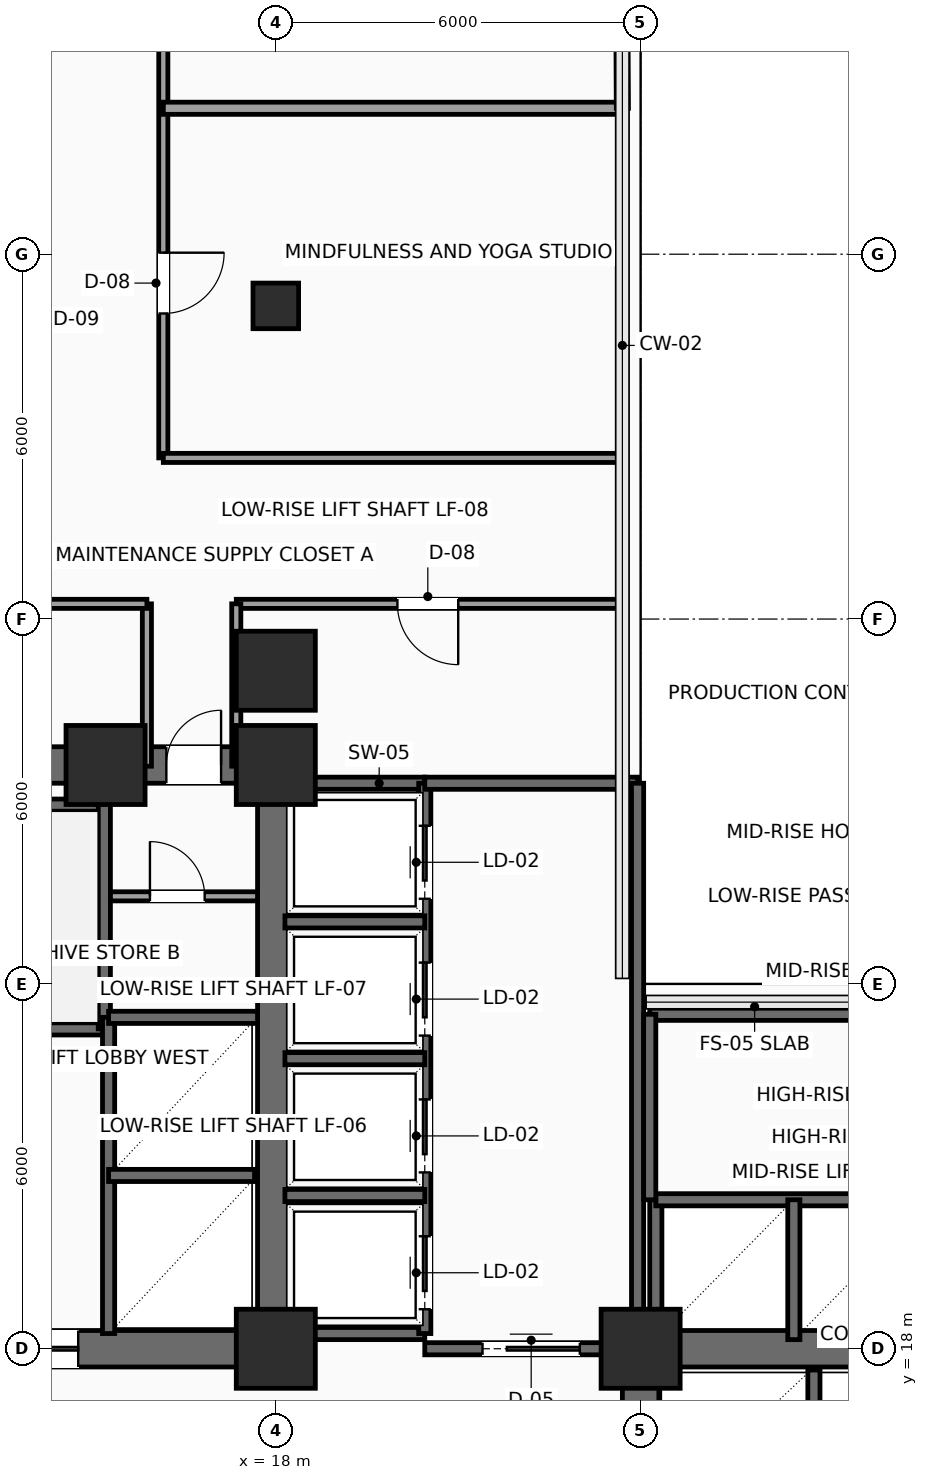
"""IFC4 building model, lengths in metres.
Left out: names, types, materials, properties, quantities, classifications, styles, units other than length and angle.
Written with IfcOpenShell. Run it as: python <this file> out.ifc"""

import sys

from ifc_helpers import new_model, si_unit, direction, frame, frame_2d, origin, origin_2d, place, context, subcontext, project, spatial, rectangle, hollow_rectangle, extrude, element, fill, save


model = new_model("IFC4")
c1 = context("Model", 3, precision=1e-05, world=origin(), true_north=direction((0.0, 1.0)))
c2 = subcontext(c1, "Body", "Model", "MODEL_VIEW")
j1 = project(units=[si_unit("LENGTHUNIT", "METRE"), si_unit("PLANEANGLEUNIT", "RADIAN")], contexts=[c1])
p1 = place(None, origin())
s1 = spatial("IfcSite", under=j1, at=p1, CompositionType="ELEMENT")
p2 = place(p1, origin())
s2 = spatial("IfcBuilding", under=s1, at=p2, CompositionType="ELEMENT")
p3 = place(p2, frame((0.0, 0.0, 67.5)))
s3 = spatial("IfcBuildingStorey", under=s2, at=p3, CompositionType="ELEMENT", Elevation=67.5)
for number, where, z_axis, x_axis in (
    (1, (18.0, 18.0, 0.0), (0.0, 0.0, 1.0), (1.0, 0.0, 0.0)),
    (2, (15.2, 27.6, 0.0), (0.0, 0.0, 1.0), (1.0, 0.0, 0.0)),
    (3, (18.0, 27.6, 0.0), (0.0, 0.0, 1.0), (1.0, 0.0, 0.0)),
    (4, (24.0, 18.0, 0.0), (0.0, 0.0, 1.0), (1.0, 0.0, 0.0)),
    (5, (18.0, 29.15, 0.0), (0.0, 0.0, 1.0), (1.0, 0.0, 0.0)),
):
    element("IfcColumn", number, at=place(p3, frame(where, z_axis=z_axis, x_axis=x_axis)), inside=s3, PredefinedType="COLUMN", context=c2, shape_type="SweptSolid", body=[
        extrude(rectangle(XDim=1.3, YDim=1.3, at=origin_2d()), origin(), (0.0, 0.0, 1.0), 3.9),
    ])
p4 = place(p3, frame((18.0, 35.15, 0.0), z_axis=(0.0, 0.0, 1.0), x_axis=(1.0, 0.0, 0.0)))
e6 = element("IfcColumn", 6, at=p4, inside=s3, PredefinedType="COLUMN", context=c2, shape_type="SweptSolid", body=[
    extrude(hollow_rectangle(XDim=0.75, YDim=0.75, WallThickness=0.035, InnerFilletRadius=0.035, OuterFilletRadius=0.05, at=origin_2d()), origin(), (0.0, 0.0, 1.0), 3.9),
])
p5 = place(p3, frame((6.0, 18.0, 0.0), z_axis=(0.0, 0.0, 1.0), x_axis=(1.0, 0.0, 0.0)))
e7 = element("IfcWall", 7, at=p5, inside=s3, PredefinedType="SHEAR", context=c2, shape_type="SweptSolid", body=[
    extrude(rectangle(XDim=12.0, YDim=0.6, at=frame_2d((6.0, 0.0))), origin(), (0.0, 0.0, 1.0), 3.65),
])
p6 = place(p5, frame((7.15, 0.0, 0.0)))
e8 = element("IfcOpeningElement", 8, at=p6, cuts=e7, PredefinedType="OPENING", context=c2, shape_type="SweptSolid", body=[
    extrude(rectangle(XDim=1.6, YDim=2.3, at=frame_2d((0.8, 1.15))), frame((0.0, 0.31, 0.0), z_axis=(0.0, -1.0, 0.0), x_axis=(1.0, 0.0, 0.0)), (0.0, 0.0, 1.0), 0.62),
])
p7 = place(p3, frame((6.0, 27.6, 0.0), z_axis=(0.0, 0.0, 1.0), x_axis=(1.0, 0.0, 0.0)))
e9 = element("IfcWall", 9, at=p7, inside=s3, PredefinedType="SHEAR", context=c2, shape_type="SweptSolid", body=[
    extrude(rectangle(XDim=12.0, YDim=0.6, at=frame_2d((6.0, 0.0))), origin(), (0.0, 0.0, 1.0), 3.65),
])
p8 = place(p7, frame((10.2, 0.0, 0.0)))
e10 = element("IfcOpeningElement", 10, at=p8, cuts=e9, PredefinedType="OPENING", context=c2, shape_type="SweptSolid", body=[
    extrude(rectangle(XDim=0.9, YDim=2.15, at=frame_2d((0.45, 1.075))), frame((0.0, 0.31, 0.0), z_axis=(0.0, -1.0, 0.0), x_axis=(1.0, 0.0, 0.0)), (0.0, 0.0, 1.0), 0.62),
])
for number, where, z_axis, x_axis in (
    (11, (18.0, 18.0, 0.0), (0.0, 0.0, 1.0), (0.0, 1.0, 0.0)),
    (12, (24.0, 18.0, 0.0), (0.0, 0.0, 1.0), (1.0, 0.0, 0.0)),
):
    element("IfcWall", number, at=place(p3, frame(where, z_axis=z_axis, x_axis=x_axis)), inside=s3, PredefinedType="SHEAR", context=c2, shape_type="SweptSolid", body=[
        extrude(rectangle(XDim=9.6, YDim=0.6, at=frame_2d((4.8, 0.0))), origin(), (0.0, 0.0, 1.0), 3.65),
    ])
p9 = place(p3, frame((24.0, 6.0, 0.0), z_axis=(0.0, 0.0, 1.0), x_axis=(0.0, 1.0, 0.0)))
e13 = element("IfcWall", 13, at=p9, inside=s3, PredefinedType="SHEAR", context=c2, shape_type="SweptSolid", body=[
    extrude(rectangle(XDim=12.0, YDim=0.6, at=frame_2d((6.0, 0.0))), origin(), (0.0, 0.0, 1.0), 3.65),
])
p10 = place(p9, frame((7.15, 0.0, 0.0)))
e14 = element("IfcOpeningElement", 14, at=p10, cuts=e13, PredefinedType="OPENING", context=c2, shape_type="SweptSolid", body=[
    extrude(rectangle(XDim=1.6, YDim=2.3, at=frame_2d((0.8, 1.15))), frame((0.0, 0.31, 0.0), z_axis=(0.0, -1.0, 0.0), x_axis=(1.0, 0.0, 0.0)), (0.0, 0.0, 1.0), 0.62),
])
p11 = place(p3, frame((6.3, 23.26, 0.0), z_axis=(0.0, 0.0, 1.0), x_axis=(1.0, 0.0, 0.0)))
e15 = element("IfcWall", 15, at=p11, inside=s3, PredefinedType="SHEAR", context=c2, shape_type="SweptSolid", body=[
    extrude(rectangle(XDim=8.88, YDim=0.2, at=frame_2d((4.44, 0.0))), origin(), (0.0, 0.0, 1.0), 3.65),
])
p12 = place(p11, frame((0.35, 0.0, 0.0)))
e16 = element("IfcOpeningElement", 16, at=p12, cuts=e15, PredefinedType="OPENING", context=c2, shape_type="SweptSolid", body=[
    extrude(rectangle(XDim=1.1, YDim=2.2, at=frame_2d((0.55, 1.1))), frame((0.0, 0.11, 0.0), z_axis=(0.0, -1.0, 0.0), x_axis=(1.0, 0.0, 0.0)), (0.0, 0.0, 1.0), 0.22),
])
p13 = place(p3, frame((6.3, 26.94, 0.0), z_axis=(0.0, 0.0, 1.0), x_axis=(1.0, 0.0, 0.0)))
e17 = element("IfcWall", 17, at=p13, inside=s3, PredefinedType="SHEAR", context=c2, shape_type="SweptSolid", body=[
    extrude(rectangle(XDim=8.88, YDim=0.2, at=frame_2d((4.44, 0.0))), origin(), (0.0, 0.0, 1.0), 3.65),
])
p14 = place(p3, frame((15.18, 23.26, 0.0), z_axis=(0.0, 0.0, 1.0), x_axis=(0.0, 1.0, 0.0)))
e18 = element("IfcWall", 18, at=p14, inside=s3, PredefinedType="SHEAR", context=c2, shape_type="SweptSolid", body=[
    extrude(rectangle(XDim=4.04, YDim=0.2, at=frame_2d((2.02, 0.0))), origin(), (0.0, 0.0, 1.0), 3.65),
])
p15 = place(p3, frame((15.25, 18.25, 0.0), z_axis=(0.0, 0.0, 1.0), x_axis=(0.0, 1.0, 0.0)))
e19 = element("IfcWall", 19, at=p15, inside=s3, PredefinedType="SHEAR", context=c2, shape_type="SweptSolid", body=[
    extrude(rectangle(XDim=5.2, YDim=0.2, at=frame_2d((2.6, 0.0))), origin(), (0.0, 0.0, 1.0), 3.65),
])
p16 = place(p3, frame((15.25, 20.85, 0.0), z_axis=(0.0, 0.0, 1.0), x_axis=(1.0, 0.0, 0.0)))
e20 = element("IfcWall", 20, at=p16, inside=s3, PredefinedType="SHEAR", context=c2, shape_type="SweptSolid", body=[
    extrude(rectangle(XDim=2.4, YDim=0.2, at=frame_2d((1.2, 0.0))), origin(), (0.0, 0.0, 1.0), 3.65),
])
p17 = place(p3, frame((15.25, 23.45, 0.0), z_axis=(0.0, 0.0, 1.0), x_axis=(1.0, 0.0, 0.0)))
e21 = element("IfcWall", 21, at=p17, inside=s3, PredefinedType="SHEAR", context=c2, shape_type="SweptSolid", body=[
    extrude(rectangle(XDim=2.45, YDim=0.2, at=frame_2d((1.225, 0.0))), origin(), (0.0, 0.0, 1.0), 3.65),
])
p18 = place(p3, frame((26.85, 15.25, 0.0), z_axis=(0.0, 0.0, 1.0), x_axis=(0.0, 1.0, 0.0)))
e22 = element("IfcWall", 22, at=p18, inside=s3, PredefinedType="SHEAR", context=c2, shape_type="SweptSolid", body=[
    extrude(rectangle(XDim=2.4, YDim=0.2, at=frame_2d((1.2, 0.0))), origin(), (0.0, 0.0, 1.0), 3.65),
])
p19 = place(p3, frame((15.28, 25.44, 0.0), z_axis=(0.0, 0.0, 1.0), x_axis=(1.0, 0.0, 0.0)))
e23 = element("IfcWall", 23, at=p19, inside=s3, PredefinedType="PARTITIONING", context=c2, shape_type="SweptSolid", body=[
    extrude(rectangle(XDim=2.42, YDim=0.15, at=frame_2d((1.21, 0.0))), origin(), (0.0, 0.0, 1.0), 3.65),
])
p20 = place(p19, frame((0.65, 0.0, 0.0)))
e24 = element("IfcOpeningElement", 24, at=p20, cuts=e23, PredefinedType="OPENING", context=c2, shape_type="SweptSolid", body=[
    extrude(rectangle(XDim=0.9, YDim=2.15, at=frame_2d((0.45, 1.075))), frame((0.0, 0.085, 0.0), z_axis=(0.0, -1.0, 0.0), x_axis=(1.0, 0.0, 0.0)), (0.0, 0.0, 1.0), 0.17),
])
for number, where, z_axis, x_axis in (
    (25, (18.1, 27.3, 0.0), (0.0, 0.0, 1.0), (1.0, 0.0, 0.0)),
    (26, (18.1, 18.25, 0.0), (0.0, 0.0, 1.0), (1.0, 0.0, 0.0)),
):
    element("IfcWall", number, at=place(p3, frame(where, z_axis=z_axis, x_axis=x_axis)), inside=s3, PredefinedType="SHEAR", context=c2, shape_type="SweptSolid", body=[
        extrude(rectangle(XDim=2.35, YDim=0.2, at=frame_2d((1.175, 0.0))), origin(), (0.0, 0.0, 1.0), 3.65),
    ])
p21 = place(p3, frame((20.45, 18.25, 0.0), z_axis=(0.0, 0.0, 1.0), x_axis=(0.0, 1.0, 0.0)))
e27 = element("IfcWall", 27, at=p21, inside=s3, PredefinedType="SHEAR", context=c2, shape_type="SweptSolid", body=[
    extrude(rectangle(XDim=9.05, YDim=0.2, at=frame_2d((4.525, 0.0))), origin(), (0.0, 0.0, 1.0), 3.65),
])
p22 = place(p21, frame((0.4, 0.0, 0.0)))
e28 = element("IfcOpeningElement", 28, at=p22, cuts=e27, PredefinedType="OPENING", context=c2, shape_type="SweptSolid", body=[
    extrude(rectangle(XDim=1.2, YDim=2.2, at=frame_2d((0.6, 1.1))), frame((0.0, 0.11, 0.0), z_axis=(0.0, -1.0, 0.0), x_axis=(1.0, 0.0, 0.0)), (0.0, 0.0, 1.0), 0.22),
])
p23 = place(p21, frame((2.65, 0.0, 0.0)))
e29 = element("IfcOpeningElement", 29, at=p23, cuts=e27, PredefinedType="OPENING", context=c2, shape_type="SweptSolid", body=[
    extrude(rectangle(XDim=1.2, YDim=2.2, at=frame_2d((0.6, 1.1))), frame((0.0, 0.11, 0.0), z_axis=(0.0, -1.0, 0.0), x_axis=(1.0, 0.0, 0.0)), (0.0, 0.0, 1.0), 0.22),
])
p24 = place(p21, frame((4.9, 0.0, 0.0)))
e30 = element("IfcOpeningElement", 30, at=p24, cuts=e27, PredefinedType="OPENING", context=c2, shape_type="SweptSolid", body=[
    extrude(rectangle(XDim=1.2, YDim=2.2, at=frame_2d((0.6, 1.1))), frame((0.0, 0.11, 0.0), z_axis=(0.0, -1.0, 0.0), x_axis=(1.0, 0.0, 0.0)), (0.0, 0.0, 1.0), 0.22),
])
p25 = place(p21, frame((7.15, 0.0, 0.0)))
e31 = element("IfcOpeningElement", 31, at=p25, cuts=e27, PredefinedType="OPENING", context=c2, shape_type="SweptSolid", body=[
    extrude(rectangle(XDim=1.2, YDim=2.2, at=frame_2d((0.6, 1.1))), frame((0.0, 0.11, 0.0), z_axis=(0.0, -1.0, 0.0), x_axis=(1.0, 0.0, 0.0)), (0.0, 0.0, 1.0), 0.22),
])
for number, where, z_axis, x_axis in (
    (32, (18.15, 20.52, 0.0), (0.0, 0.0, 1.0), (1.0, 0.0, 0.0)),
    (33, (18.15, 22.77, 0.0), (0.0, 0.0, 1.0), (1.0, 0.0, 0.0)),
    (34, (18.15, 25.02, 0.0), (0.0, 0.0, 1.0), (1.0, 0.0, 0.0)),
):
    element("IfcWall", number, at=place(p3, frame(where, z_axis=z_axis, x_axis=x_axis)), inside=s3, PredefinedType="SHEAR", context=c2, shape_type="SweptSolid", body=[
        extrude(rectangle(XDim=2.3, YDim=0.2, at=frame_2d((1.15, 0.0))), origin(), (0.0, 0.0, 1.0), 3.65),
    ])
p26 = place(p3, frame((20.45, 18.0, 0.0), z_axis=(0.0, 0.0, 1.0), x_axis=(1.0, 0.0, 0.0)))
e35 = element("IfcWall", 35, at=p26, inside=s3, PredefinedType="SHEAR", context=c2, shape_type="SweptSolid", body=[
    extrude(rectangle(XDim=3.5, YDim=0.2, at=frame_2d((1.75, 0.0))), origin(), (0.0, 0.0, 1.0), 3.65),
])
p27 = place(p26, frame((0.95, 0.0, 0.0)))
e36 = element("IfcOpeningElement", 36, at=p27, cuts=e35, PredefinedType="OPENING", context=c2, shape_type="SweptSolid", body=[
    extrude(rectangle(XDim=1.6, YDim=2.3, at=frame_2d((0.8, 1.15))), frame((0.0, 0.11, 0.0), z_axis=(0.0, -1.0, 0.0), x_axis=(1.0, 0.0, 0.0)), (0.0, 0.0, 1.0), 0.22),
])
p28 = place(p3, frame((20.45, 27.3, 0.0), z_axis=(0.0, 0.0, 1.0), x_axis=(1.0, 0.0, 0.0)))
e37 = element("IfcWall", 37, at=p28, inside=s3, PredefinedType="SHEAR", context=c2, shape_type="SweptSolid", body=[
    extrude(rectangle(XDim=3.5, YDim=0.2, at=frame_2d((1.75, 0.0))), origin(), (0.0, 0.0, 1.0), 3.65),
])
p29 = place(p3, frame((23.95, 18.0, 0.0), z_axis=(0.0, 0.0, 1.0), x_axis=(0.0, 1.0, 0.0)))
e38 = element("IfcWall", 38, at=p29, inside=s3, PredefinedType="SHEAR", context=c2, shape_type="SweptSolid", body=[
    extrude(rectangle(XDim=9.3, YDim=0.2, at=frame_2d((4.65, 0.0))), origin(), (0.0, 0.0, 1.0), 3.65),
])
p30 = place(p3, frame((24.25, 18.1, 0.0), z_axis=(0.0, 0.0, 1.0), x_axis=(0.0, 1.0, 0.0)))
e39 = element("IfcWall", 39, at=p30, inside=s3, PredefinedType="SHEAR", context=c2, shape_type="SweptSolid", body=[
    extrude(rectangle(XDim=2.35, YDim=0.2, at=frame_2d((1.175, 0.0))), origin(), (0.0, 0.0, 1.0), 3.65),
])
p31 = place(p3, frame((24.25, 20.45, 0.0), z_axis=(0.0, 0.0, 1.0), x_axis=(1.0, 0.0, 0.0)))
e40 = element("IfcWall", 40, at=p31, inside=s3, PredefinedType="SHEAR", context=c2, shape_type="SweptSolid", body=[
    extrude(rectangle(XDim=9.05, YDim=0.2, at=frame_2d((4.525, 0.0))), origin(), (0.0, 0.0, 1.0), 3.65),
])
p32 = place(p3, frame((26.52, 18.15, 0.0), z_axis=(0.0, 0.0, 1.0), x_axis=(0.0, 1.0, 0.0)))
e41 = element("IfcWall", 41, at=p32, inside=s3, PredefinedType="SHEAR", context=c2, shape_type="SweptSolid", body=[
    extrude(rectangle(XDim=2.3, YDim=0.2, at=frame_2d((1.15, 0.0))), origin(), (0.0, 0.0, 1.0), 3.65),
])
p33 = place(p3, frame((24.15, 23.5, 0.0), z_axis=(0.0, 0.0, 1.0), x_axis=(1.0, 0.0, 0.0)))
e42 = element("IfcWall", 42, at=p33, inside=s3, PredefinedType="SHEAR", context=c2, shape_type="SweptSolid", body=[
    extrude(rectangle(XDim=9.15, YDim=0.2, at=frame_2d((4.575, 0.0))), origin(), (0.0, 0.0, 1.0), 3.65),
])
p34 = place(p3, frame((24.15, 20.45, 0.0), z_axis=(0.0, 0.0, 1.0), x_axis=(0.0, 1.0, 0.0)))
e43 = element("IfcWall", 43, at=p34, inside=s3, PredefinedType="SHEAR", context=c2, shape_type="SweptSolid", body=[
    extrude(rectangle(XDim=3.05, YDim=0.2, at=frame_2d((1.525, 0.0))), origin(), (0.0, 0.0, 1.0), 3.65),
])
p35 = place(p3, frame((16.15, 44.9, 0.0), z_axis=(0.0, 0.0, 1.0), x_axis=(0.0, -1.0, 0.0)))
e44 = element("IfcWall", 44, at=p35, inside=s3, PredefinedType="PARTITIONING", context=c2, shape_type="SweptSolid", body=[
    extrude(rectangle(XDim=12.25, YDim=0.15, at=frame_2d((6.125, 0.0))), origin(), (0.0, 0.0, 1.0), 3.65),
])
p36 = place(p35, frame((8.875, 0.0, 0.0)))
e45 = element("IfcOpeningElement", 45, at=p36, cuts=e44, PredefinedType="OPENING", context=c2, shape_type="SweptSolid", body=[
    extrude(rectangle(XDim=1.0, YDim=2.2, at=frame_2d((0.5, 1.1))), frame((0.0, 0.085, 0.0), z_axis=(0.0, -1.0, 0.0), x_axis=(1.0, 0.0, 0.0)), (0.0, 0.0, 1.0), 0.17),
])
p37 = place(p35, frame((1.88, 0.0, 0.0)))
e46 = element("IfcOpeningElement", 46, at=p37, cuts=e44, PredefinedType="OPENING", context=c2, shape_type="SweptSolid", body=[
    extrude(rectangle(XDim=1.0, YDim=2.2, at=frame_2d((0.5, 1.1))), frame((0.0, 0.085, 0.0), z_axis=(0.0, -1.0, 0.0), x_axis=(1.0, 0.0, 0.0)), (0.0, 0.0, 1.0), 0.17),
])
p38 = place(p3, frame((16.15, 32.65, 0.0), z_axis=(0.0, 0.0, 1.0), x_axis=(1.0, 0.0, 0.0)))
e47 = element("IfcWall", 47, at=p38, inside=s3, PredefinedType="PARTITIONING", context=c2, shape_type="SweptSolid", body=[
    extrude(rectangle(XDim=7.55, YDim=0.15, at=frame_2d((3.775, 0.0))), origin(), (0.0, 0.0, 1.0), 3.65),
])
p39 = place(p3, frame((23.7, 30.25, 0.0), z_axis=(0.0, 0.0, 1.0), x_axis=(-1.0, 0.0, 0.0)))
e48 = element("IfcWall", 48, at=p39, inside=s3, PredefinedType="PARTITIONING", context=c2, shape_type="SweptSolid", body=[
    extrude(rectangle(XDim=6.35, YDim=0.15, at=frame_2d((3.175, 0.0))), origin(), (0.0, 0.0, 1.0), 3.65),
])
p40 = place(p39, frame((2.7, 0.0, 0.0)))
e49 = element("IfcOpeningElement", 49, at=p40, cuts=e48, PredefinedType="OPENING", context=c2, shape_type="SweptSolid", body=[
    extrude(rectangle(XDim=1.0, YDim=2.2, at=frame_2d((0.5, 1.1))), frame((0.0, 0.085, 0.0), z_axis=(0.0, -1.0, 0.0), x_axis=(1.0, 0.0, 0.0)), (0.0, 0.0, 1.0), 0.17),
])
for number, where, z_axis, x_axis in (
    (50, (17.35, 30.25, 0.0), (0.0, 0.0, 1.0), (0.0, -1.0, 0.0)),
    (51, (15.88, 27.58, 0.0), (0.0, 0.0, 1.0), (0.0, 1.0, 0.0)),
):
    element("IfcWall", number, at=place(p3, frame(where, z_axis=z_axis, x_axis=x_axis)), inside=s3, PredefinedType="PARTITIONING", context=c2, shape_type="SweptSolid", body=[
        extrude(rectangle(XDim=2.67, YDim=0.15, at=frame_2d((1.335, 0.0))), origin(), (0.0, 0.0, 1.0), 3.65),
    ])
p41 = place(p3, frame((15.88, 30.25, 0.0), z_axis=(0.0, 0.0, 1.0), x_axis=(-1.0, 0.0, 0.0)))
e52 = element("IfcWall", 52, at=p41, inside=s3, PredefinedType="PARTITIONING", context=c2, shape_type="SweptSolid", body=[
    extrude(rectangle(XDim=10.63, YDim=0.15, at=frame_2d((5.315, 0.0))), origin(), (0.0, 0.0, 1.0), 3.65),
])
p42 = place(p41, frame((6.13, 0.0, 0.0)))
e53 = element("IfcOpeningElement", 53, at=p42, cuts=e52, PredefinedType="OPENING", context=c2, shape_type="SweptSolid", body=[
    extrude(rectangle(XDim=0.9, YDim=2.1, at=frame_2d((0.45, 1.05))), frame((0.0, 0.085, 0.0), z_axis=(0.0, -1.0, 0.0), x_axis=(1.0, 0.0, 0.0)), (0.0, 0.0, 1.0), 0.17),
])
p43 = place(p3, frame((16.15, 38.4, 0.0), z_axis=(0.0, 0.0, 1.0), x_axis=(1.0, 0.0, 0.0)))
e54 = element("IfcWall", 54, at=p43, inside=s3, PredefinedType="PARTITIONING", context=c2, shape_type="SweptSolid", body=[
    extrude(rectangle(XDim=7.55, YDim=0.2, at=frame_2d((3.775, 0.0))), origin(), (0.0, 0.0, 1.0), 3.142),
])
p44 = place(p3, frame((23.7, 38.4, 0.0), z_axis=(0.0, 0.0, 1.0), x_axis=(-0.005410604923, 0.99998536257, 0.0)))
e55 = element("IfcWall", 55, at=p44, inside=s3, PredefinedType="PARTITIONING", context=c2, shape_type="SweptSolid", body=[
    extrude(rectangle(XDim=9.25, YDim=0.2, at=frame_2d((4.625, 0.0))), origin(), (0.0, 0.0, 1.0), 3.65),
])
p45 = place(p6, origin())
e56 = element("IfcDoor", 56, at=p45, inside=s3, OperationType="DOUBLE_DOOR_SLIDING", PredefinedType="DOOR", context=c2, shape_type="SweptSolid", body=[
    extrude(rectangle(XDim=1.6, YDim=2.3, at=frame_2d((0.8, 1.15))), frame((0.0, 0.025, 0.0), z_axis=(0.0, -1.0, 0.0), x_axis=(1.0, 0.0, 0.0)), (0.0, 0.0, 1.0), 0.05),
])
fill(e8, e56)
p46 = place(p8, origin())
e57 = element("IfcDoor", 57, at=p46, inside=s3, OperationType="SINGLE_SWING_RIGHT", PredefinedType="DOOR", context=c2, shape_type="SweptSolid", body=[
    extrude(rectangle(XDim=0.9, YDim=2.15, at=frame_2d((0.45, 1.075))), frame((0.0, 0.025, 0.0), z_axis=(0.0, -1.0, 0.0), x_axis=(1.0, 0.0, 0.0)), (0.0, 0.0, 1.0), 0.05),
])
fill(e10, e57)
p47 = place(p20, origin())
e58 = element("IfcDoor", 58, at=p47, inside=s3, OperationType="SINGLE_SWING_LEFT", PredefinedType="DOOR", context=c2, shape_type="SweptSolid", body=[
    extrude(rectangle(XDim=0.9, YDim=2.15, at=frame_2d((0.45, 1.075))), frame((0.0, 0.025, 0.0), z_axis=(0.0, -1.0, 0.0), x_axis=(1.0, 0.0, 0.0)), (0.0, 0.0, 1.0), 0.05),
])
fill(e24, e58)
p48 = place(p22, origin())
e59 = element("IfcDoor", 59, at=p48, inside=s3, OperationType="SLIDING_TO_RIGHT", PredefinedType="DOOR", context=c2, shape_type="SweptSolid", body=[
    extrude(rectangle(XDim=1.2, YDim=2.2, at=frame_2d((0.6, 1.1))), frame((0.0, 0.025, 0.0), z_axis=(0.0, -1.0, 0.0), x_axis=(1.0, 0.0, 0.0)), (0.0, 0.0, 1.0), 0.05),
])
fill(e28, e59)
p49 = place(p23, origin())
e60 = element("IfcDoor", 60, at=p49, inside=s3, OperationType="SLIDING_TO_RIGHT", PredefinedType="DOOR", context=c2, shape_type="SweptSolid", body=[
    extrude(rectangle(XDim=1.2, YDim=2.2, at=frame_2d((0.6, 1.1))), frame((0.0, 0.025, 0.0), z_axis=(0.0, -1.0, 0.0), x_axis=(1.0, 0.0, 0.0)), (0.0, 0.0, 1.0), 0.05),
])
fill(e29, e60)
p50 = place(p24, origin())
e61 = element("IfcDoor", 61, at=p50, inside=s3, OperationType="SLIDING_TO_RIGHT", PredefinedType="DOOR", context=c2, shape_type="SweptSolid", body=[
    extrude(rectangle(XDim=1.2, YDim=2.2, at=frame_2d((0.6, 1.1))), frame((0.0, 0.025, 0.0), z_axis=(0.0, -1.0, 0.0), x_axis=(1.0, 0.0, 0.0)), (0.0, 0.0, 1.0), 0.05),
])
fill(e30, e61)
p51 = place(p25, origin())
e62 = element("IfcDoor", 62, at=p51, inside=s3, OperationType="SLIDING_TO_RIGHT", PredefinedType="DOOR", context=c2, shape_type="SweptSolid", body=[
    extrude(rectangle(XDim=1.2, YDim=2.2, at=frame_2d((0.6, 1.1))), frame((0.0, 0.025, 0.0), z_axis=(0.0, -1.0, 0.0), x_axis=(1.0, 0.0, 0.0)), (0.0, 0.0, 1.0), 0.05),
])
fill(e31, e62)
p52 = place(p27, origin())
e63 = element("IfcDoor", 63, at=p52, inside=s3, OperationType="DOUBLE_DOOR_SLIDING", PredefinedType="DOOR", context=c2, shape_type="SweptSolid", body=[
    extrude(rectangle(XDim=1.6, YDim=2.3, at=frame_2d((0.8, 1.15))), frame((0.0, 0.025, 0.0), z_axis=(0.0, -1.0, 0.0), x_axis=(1.0, 0.0, 0.0)), (0.0, 0.0, 1.0), 0.05),
])
fill(e36, e63)
p53 = place(p36, origin())
e64 = element("IfcDoor", 64, at=p53, inside=s3, OperationType="SINGLE_SWING_LEFT", PredefinedType="DOOR", context=c2, shape_type="SweptSolid", body=[
    extrude(rectangle(XDim=1.0, YDim=2.2, at=frame_2d((0.5, 1.1))), frame((0.0, 0.025, 0.0), z_axis=(0.0, -1.0, 0.0), x_axis=(1.0, 0.0, 0.0)), (0.0, 0.0, 1.0), 0.05),
])
fill(e45, e64)
p54 = place(p40, origin())
e65 = element("IfcDoor", 65, at=p54, inside=s3, OperationType="SINGLE_SWING_LEFT", PredefinedType="DOOR", context=c2, shape_type="SweptSolid", body=[
    extrude(rectangle(XDim=1.0, YDim=2.2, at=frame_2d((0.5, 1.1))), frame((0.0, 0.025, 0.0), z_axis=(0.0, -1.0, 0.0), x_axis=(1.0, 0.0, 0.0)), (0.0, 0.0, 1.0), 0.05),
])
fill(e49, e65)
save(model, sys.argv[1])
